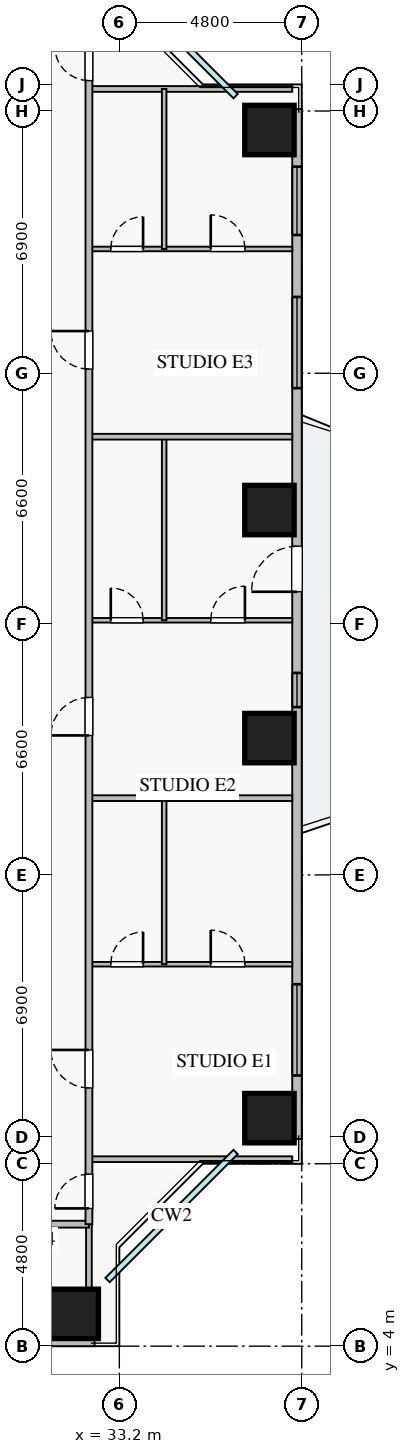
"""IFC4 building model, lengths in metres.
Left out: names, types, materials, properties, quantities, classifications, styles, units other than length and angle.
Written with IfcOpenShell. Run it as: python <this file> out.ifc"""

import sys

from ifc_helpers import new_model, si_unit, direction, frame, frame_2d, origin, origin_2d, place, context, subcontext, project, spatial, rectangle, extrude, source, transform, mapped, element, fill, save


model = new_model("IFC4")
c1 = context("Model", 3, precision=1e-05, world=origin(), true_north=direction((0.0, 1.0)))
c2 = subcontext(c1, "Body", "Model", "MODEL_VIEW")
j1 = project(units=[si_unit("LENGTHUNIT", "METRE"), si_unit("PLANEANGLEUNIT", "RADIAN")], contexts=[c1])
p1 = place(None, origin())
s1 = spatial("IfcSite", under=j1, at=p1, CompositionType="ELEMENT")
p2 = place(p1, origin())
s2 = spatial("IfcBuilding", under=s1, at=p2, CompositionType="ELEMENT")
p3 = place(p2, frame((0.0, 0.0, 53.5)))
s3 = spatial("IfcBuildingStorey", under=s2, at=p3, CompositionType="ELEMENT", Elevation=53.5)
m1 = source(origin(), c2, "Body", "SweptSolid", [
    extrude(rectangle(XDim=1.3, YDim=1.3, at=origin_2d()), origin(), (0.0, 0.0, 1.0), 3.25),
])
for number, where, z_axis, x_axis in (
    (1, (32.0, 4.85, 0.0), (0.0, 0.0, 1.0), (1.0, 0.0, 0.0)),
    (2, (37.15, 10.0, 0.0), (0.0, 0.0, 1.0), (1.0, 0.0, 0.0)),
    (3, (37.15, 20.0, 0.0), (0.0, 0.0, 1.0), (1.0, 0.0, 0.0)),
    (4, (37.15, 26.0, 0.0), (0.0, 0.0, 1.0), (1.0, 0.0, 0.0)),
    (5, (37.15, 36.0, 0.0), (0.0, 0.0, 1.0), (1.0, 0.0, 0.0)),
):
    element("IfcColumn", number, at=place(p3, frame(where, z_axis=z_axis, x_axis=x_axis)), inside=s3, PredefinedType="COLUMN", context=c2, shape_type="MappedRepresentation", body=[
        mapped(m1, transform((0.0, 0.0, 0.0), x_axis=(1.0, 0.0, 0.0), y_axis=(0.0, 1.0, 0.0), z_axis=(0.0, 0.0, 1.0), scale=1.0)),
    ])
p4 = place(p3, frame((5.45, 4.125, 0.0), z_axis=(0.0, 0.0, 1.0), x_axis=(1.0, 0.0, 0.0)))
e6 = element("IfcWall", 6, at=p4, inside=s3, PredefinedType="STANDARD", context=c2, shape_type="SweptSolid", body=[
    extrude(rectangle(XDim=27.1, YDim=0.25, at=frame_2d((13.55, 0.0))), origin(), (0.0, 0.0, 1.0), 2.61),
])
p5 = place(p4, frame((14.4, 0.0, 0.0)))
e7 = element("IfcOpeningElement", 7, at=p5, cuts=e6, PredefinedType="OPENING", context=c2, shape_type="SweptSolid", body=[
    extrude(rectangle(XDim=1.2, YDim=2.1, at=frame_2d((0.6, 1.05))), frame((0.0, 0.135, 0.0), z_axis=(0.0, -1.0, 0.0), x_axis=(1.0, 0.0, 0.0)), (0.0, 0.0, 1.0), 0.27),
])
p6 = place(p4, frame((1.5, 0.0, 0.9)))
e8 = element("IfcOpeningElement", 8, at=p6, cuts=e6, PredefinedType="OPENING", context=c2, shape_type="SweptSolid", body=[
    extrude(rectangle(XDim=1.5, YDim=1.5, at=frame_2d((0.75, 0.75))), frame((0.0, 0.135, 0.0), z_axis=(0.0, -1.0, 0.0), x_axis=(1.0, 0.0, 0.0)), (0.0, 0.0, 1.0), 0.27),
])
p7 = place(p4, frame((9.263, 0.0, 0.9)))
e9 = element("IfcOpeningElement", 9, at=p7, cuts=e6, PredefinedType="OPENING", context=c2, shape_type="SweptSolid", body=[
    extrude(rectangle(XDim=1.8, YDim=1.45, at=frame_2d((0.9, 0.725))), frame((0.0, 0.135, 0.0), z_axis=(0.0, -1.0, 0.0), x_axis=(1.0, 0.0, 0.0)), (0.0, 0.0, 1.0), 0.27),
])
p8 = place(p4, frame((17.95, 0.0, 0.9)))
e10 = element("IfcOpeningElement", 10, at=p8, cuts=e6, PredefinedType="OPENING", context=c2, shape_type="SweptSolid", body=[
    extrude(rectangle(XDim=1.5, YDim=1.5, at=frame_2d((0.75, 0.75))), frame((0.0, 0.135, 0.0), z_axis=(0.0, -1.0, 0.0), x_axis=(1.0, 0.0, 0.0)), (0.0, 0.0, 1.0), 0.27),
])
p9 = place(p4, frame((22.663, 0.0, 0.9)))
e11 = element("IfcOpeningElement", 11, at=p9, cuts=e6, PredefinedType="OPENING", context=c2, shape_type="SweptSolid", body=[
    extrude(rectangle(XDim=2.1, YDim=1.48, at=frame_2d((1.05, 0.74))), frame((0.0, 0.135, 0.0), z_axis=(0.0, -1.0, 0.0), x_axis=(1.0, 0.0, 0.0)), (0.0, 0.0, 1.0), 0.27),
])
p10 = place(p4, frame((4.71, 0.0, 0.9)))
e12 = element("IfcOpeningElement", 12, at=p10, cuts=e6, PredefinedType="OPENING", context=c2, shape_type="SweptSolid", body=[
    extrude(rectangle(XDim=2.4, YDim=1.5, at=frame_2d((1.2, 0.75))), frame((0.0, 0.135, 0.0), z_axis=(0.0, -1.0, 0.0), x_axis=(1.0, 0.0, 0.0)), (0.0, 0.0, 1.0), 0.27),
])
p11 = place(p3, frame((37.875, 9.45, 0.0), z_axis=(0.0, 0.0, 1.0), x_axis=(0.0, 1.0, 0.0)))
e13 = element("IfcWall", 13, at=p11, inside=s3, PredefinedType="STANDARD", context=c2, shape_type="SweptSolid", body=[
    extrude(rectangle(XDim=27.1, YDim=0.25, at=frame_2d((13.55, 0.0))), origin(), (0.0, 0.0, 1.0), 2.61),
])
p12 = place(p11, frame((14.4, 0.0, 0.0)))
e14 = element("IfcOpeningElement", 14, at=p12, cuts=e13, PredefinedType="OPENING", context=c2, shape_type="SweptSolid", body=[
    extrude(rectangle(XDim=1.2, YDim=2.1, at=frame_2d((0.6, 1.05))), frame((0.0, 0.135, 0.0), z_axis=(0.0, -1.0, 0.0), x_axis=(1.0, 0.0, 0.0)), (0.0, 0.0, 1.0), 0.27),
])
p13 = place(p11, frame((1.673, 0.0, 0.9)))
e15 = element("IfcOpeningElement", 15, at=p13, cuts=e13, PredefinedType="OPENING", context=c2, shape_type="SweptSolid", body=[
    extrude(rectangle(XDim=2.4, YDim=1.5, at=frame_2d((1.2, 0.75))), frame((0.0, 0.135, 0.0), z_axis=(0.0, -1.0, 0.0), x_axis=(1.0, 0.0, 0.0)), (0.0, 0.0, 1.0), 0.27),
])
p14 = place(p11, frame((23.788, 0.0, 0.9)))
e16 = element("IfcOpeningElement", 16, at=p14, cuts=e13, PredefinedType="OPENING", context=c2, shape_type="SweptSolid", body=[
    extrude(rectangle(XDim=1.8, YDim=1.5, at=frame_2d((0.9, 0.75))), frame((0.0, 0.135, 0.0), z_axis=(0.0, -1.0, 0.0), x_axis=(1.0, 0.0, 0.0)), (0.0, 0.0, 1.0), 0.27),
])
p15 = place(p11, frame((19.758, 0.0, 0.9)))
e17 = element("IfcOpeningElement", 17, at=p15, cuts=e13, PredefinedType="OPENING", context=c2, shape_type="SweptSolid", body=[
    extrude(rectangle(XDim=2.4, YDim=1.5, at=frame_2d((1.2, 0.75))), frame((0.0, 0.135, 0.0), z_axis=(0.0, -1.0, 0.0), x_axis=(1.0, 0.0, 0.0)), (0.0, 0.0, 1.0), 0.27),
])
p16 = place(p11, frame((11.365, 0.0, 0.9)))
e18 = element("IfcOpeningElement", 18, at=p16, cuts=e13, PredefinedType="OPENING", context=c2, shape_type="SweptSolid", body=[
    extrude(rectangle(XDim=0.9, YDim=1.2, at=frame_2d((0.45, 0.6))), frame((0.0, 0.135, 0.0), z_axis=(0.0, -1.0, 0.0), x_axis=(1.0, 0.0, 0.0)), (0.0, 0.0, 1.0), 0.27),
])
p17 = place(p3, frame((32.4, 4.25, 0.0), z_axis=(0.0, 0.0, 1.0), x_axis=(0.0, 1.0, 0.0)))
e19 = element("IfcWall", 19, at=p17, inside=s3, PredefinedType="PARTITIONING", context=c2, shape_type="SweptSolid", body=[
    extrude(rectangle(XDim=2.96, YDim=0.15, at=frame_2d((1.48, 0.0))), origin(), (0.0, 0.0, 1.0), 3.07),
])
p18 = place(p3, frame((8.82, 7.21, 0.0), z_axis=(0.0, 0.0, 1.0), x_axis=(1.0, 0.0, 0.0)))
e20 = element("IfcWall", 20, at=p18, inside=s3, PredefinedType="PARTITIONING", context=c2, shape_type="SweptSolid", body=[
    extrude(rectangle(XDim=23.58, YDim=0.18, at=frame_2d((11.79, 0.0))), origin(), (0.0, 0.0, 1.0), 3.07),
])
p19 = place(p18, frame((2.04, 0.0, 0.0)))
e21 = element("IfcOpeningElement", 21, at=p19, cuts=e20, PredefinedType="OPENING", context=c2, shape_type="SweptSolid", body=[
    extrude(rectangle(XDim=1.0, YDim=2.05, at=frame_2d((0.5, 1.025))), frame((0.0, 0.1, 0.0), z_axis=(0.0, -1.0, 0.0), x_axis=(1.0, 0.0, 0.0)), (0.0, 0.0, 1.0), 0.2),
])
p20 = place(p18, frame((8.53, 0.0, 0.0)))
e22 = element("IfcOpeningElement", 22, at=p20, cuts=e20, PredefinedType="OPENING", context=c2, shape_type="SweptSolid", body=[
    extrude(rectangle(XDim=1.0, YDim=2.05, at=frame_2d((0.5, 1.025))), frame((0.0, 0.1, 0.0), z_axis=(0.0, -1.0, 0.0), x_axis=(1.0, 0.0, 0.0)), (0.0, 0.0, 1.0), 0.2),
])
p21 = place(p18, frame((14.83, 0.0, 0.0)))
e23 = element("IfcOpeningElement", 23, at=p21, cuts=e20, PredefinedType="OPENING", context=c2, shape_type="SweptSolid", body=[
    extrude(rectangle(XDim=1.0, YDim=2.05, at=frame_2d((0.5, 1.025))), frame((0.0, 0.1, 0.0), z_axis=(0.0, -1.0, 0.0), x_axis=(1.0, 0.0, 0.0)), (0.0, 0.0, 1.0), 0.2),
])
p22 = place(p18, frame((20.13, 0.0, 0.0)))
e24 = element("IfcOpeningElement", 24, at=p22, cuts=e20, PredefinedType="OPENING", context=c2, shape_type="SweptSolid", body=[
    extrude(rectangle(XDim=1.0, YDim=2.05, at=frame_2d((0.5, 1.025))), frame((0.0, 0.1, 0.0), z_axis=(0.0, -1.0, 0.0), x_axis=(1.0, 0.0, 0.0)), (0.0, 0.0, 1.0), 0.2),
])
for number, where, z_axis, x_axis in (
    (25, (32.4, 37.08, 0.0), (0.0, 0.0, 1.0), (1.0, 0.0, 0.0)),
    (26, (32.4, 8.92, 0.0), (0.0, 0.0, 1.0), (1.0, 0.0, 0.0)),
):
    element("IfcWall", number, at=place(p3, frame(where, z_axis=z_axis, x_axis=x_axis)), inside=s3, PredefinedType="PARTITIONING", context=c2, shape_type="SweptSolid", body=[
        extrude(rectangle(XDim=5.35, YDim=0.15, at=frame_2d((2.675, 0.0))), origin(), (0.0, 0.0, 1.0), 3.07),
    ])
p23 = place(p3, frame((32.4, 14.05, 0.0), z_axis=(0.0, 0.0, 1.0), x_axis=(1.0, 0.0, 0.0)))
e27 = element("IfcWall", 27, at=p23, inside=s3, PredefinedType="PLUMBINGWALL", context=c2, shape_type="SweptSolid", body=[
    extrude(rectangle(XDim=5.35, YDim=0.12, at=frame_2d((2.675, 0.0))), origin(), (0.0, 0.0, 1.0), 3.07),
])
p24 = place(p23, frame((0.575, 0.0, 0.0)))
e28 = element("IfcOpeningElement", 28, at=p24, cuts=e27, PredefinedType="OPENING", context=c2, shape_type="SweptSolid", body=[
    extrude(rectangle(XDim=0.85, YDim=2.05, at=frame_2d((0.425, 1.025))), frame((0.0, 0.07, 0.0), z_axis=(0.0, -1.0, 0.0), x_axis=(1.0, 0.0, 0.0)), (0.0, 0.0, 1.0), 0.14),
])
p25 = place(p23, frame((3.205, 0.0, 0.0)))
e29 = element("IfcOpeningElement", 29, at=p25, cuts=e27, PredefinedType="OPENING", context=c2, shape_type="SweptSolid", body=[
    extrude(rectangle(XDim=0.9, YDim=2.05, at=frame_2d((0.45, 1.025))), frame((0.0, 0.07, 0.0), z_axis=(0.0, -1.0, 0.0), x_axis=(1.0, 0.0, 0.0)), (0.0, 0.0, 1.0), 0.14),
])
p26 = place(p3, frame((34.38, 14.05, 0.0), z_axis=(0.0, 0.0, 1.0), x_axis=(0.0, 1.0, 0.0)))
e30 = element("IfcWall", 30, at=p26, inside=s3, PredefinedType="PLUMBINGWALL", context=c2, shape_type="SweptSolid", body=[
    extrude(rectangle(XDim=4.37, YDim=0.12, at=frame_2d((2.185, 0.0))), origin(), (0.0, 0.0, 1.0), 3.07),
])
p27 = place(p3, frame((32.4, 23.1, 0.0), z_axis=(0.0, 0.0, 1.0), x_axis=(1.0, 0.0, 0.0)))
e31 = element("IfcWall", 31, at=p27, inside=s3, PredefinedType="PLUMBINGWALL", context=c2, shape_type="SweptSolid", body=[
    extrude(rectangle(XDim=5.35, YDim=0.12, at=frame_2d((2.675, 0.0))), origin(), (0.0, 0.0, 1.0), 3.07),
])
p28 = place(p27, frame((0.575, 0.0, 0.0)))
e32 = element("IfcOpeningElement", 32, at=p28, cuts=e31, PredefinedType="OPENING", context=c2, shape_type="SweptSolid", body=[
    extrude(rectangle(XDim=0.85, YDim=2.05, at=frame_2d((0.425, 1.025))), frame((0.0, 0.07, 0.0), z_axis=(0.0, -1.0, 0.0), x_axis=(1.0, 0.0, 0.0)), (0.0, 0.0, 1.0), 0.14),
])
p29 = place(p27, frame((3.205, 0.0, 0.0)))
e33 = element("IfcOpeningElement", 33, at=p29, cuts=e31, PredefinedType="OPENING", context=c2, shape_type="SweptSolid", body=[
    extrude(rectangle(XDim=0.9, YDim=2.05, at=frame_2d((0.45, 1.025))), frame((0.0, 0.07, 0.0), z_axis=(0.0, -1.0, 0.0), x_axis=(1.0, 0.0, 0.0)), (0.0, 0.0, 1.0), 0.14),
])
p30 = place(p3, frame((34.38, 23.1, 0.0), z_axis=(0.0, 0.0, 1.0), x_axis=(0.0, 1.0, 0.0)))
e34 = element("IfcWall", 34, at=p30, inside=s3, PredefinedType="PLUMBINGWALL", context=c2, shape_type="SweptSolid", body=[
    extrude(rectangle(XDim=4.83, YDim=0.12, at=frame_2d((2.415, 0.0))), origin(), (0.0, 0.0, 1.0), 3.07),
])
p31 = place(p3, frame((32.4, 18.42, 0.0), z_axis=(0.0, 0.0, 1.0), x_axis=(1.0, 0.0, 0.0)))
e35 = element("IfcWall", 35, at=p31, inside=s3, PredefinedType="PARTITIONING", context=c2, shape_type="SweptSolid", body=[
    extrude(rectangle(XDim=5.35, YDim=0.15, at=frame_2d((2.675, 0.0))), origin(), (0.0, 0.0, 1.0), 3.07),
])
p32 = place(p3, frame((32.4, 32.87, 0.0), z_axis=(0.0, 0.0, 1.0), x_axis=(1.0, 0.0, 0.0)))
e36 = element("IfcWall", 36, at=p32, inside=s3, PredefinedType="PLUMBINGWALL", context=c2, shape_type="SweptSolid", body=[
    extrude(rectangle(XDim=5.35, YDim=0.12, at=frame_2d((2.675, 0.0))), origin(), (0.0, 0.0, 1.0), 3.07),
])
p33 = place(p32, frame((0.575, 0.0, 0.0)))
e37 = element("IfcOpeningElement", 37, at=p33, cuts=e36, PredefinedType="OPENING", context=c2, shape_type="SweptSolid", body=[
    extrude(rectangle(XDim=0.85, YDim=2.05, at=frame_2d((0.425, 1.025))), frame((0.0, 0.07, 0.0), z_axis=(0.0, -1.0, 0.0), x_axis=(1.0, 0.0, 0.0)), (0.0, 0.0, 1.0), 0.14),
])
p34 = place(p32, frame((3.205, 0.0, 0.0)))
e38 = element("IfcOpeningElement", 38, at=p34, cuts=e36, PredefinedType="OPENING", context=c2, shape_type="SweptSolid", body=[
    extrude(rectangle(XDim=0.9, YDim=2.05, at=frame_2d((0.45, 1.025))), frame((0.0, 0.07, 0.0), z_axis=(0.0, -1.0, 0.0), x_axis=(1.0, 0.0, 0.0)), (0.0, 0.0, 1.0), 0.14),
])
p35 = place(p3, frame((34.38, 32.87, 0.0), z_axis=(0.0, 0.0, 1.0), x_axis=(0.0, 1.0, 0.0)))
e39 = element("IfcWall", 39, at=p35, inside=s3, PredefinedType="PLUMBINGWALL", context=c2, shape_type="SweptSolid", body=[
    extrude(rectangle(XDim=4.21, YDim=0.12, at=frame_2d((2.105, 0.0))), origin(), (0.0, 0.0, 1.0), 3.07),
])
p36 = place(p3, frame((32.4, 27.93, 0.0), z_axis=(0.0, 0.0, 1.0), x_axis=(1.0, 0.0, 0.0)))
e40 = element("IfcWall", 40, at=p36, inside=s3, PredefinedType="PARTITIONING", context=c2, shape_type="SweptSolid", body=[
    extrude(rectangle(XDim=5.35, YDim=0.15, at=frame_2d((2.675, 0.0))), origin(), (0.0, 0.0, 1.0), 2.865),
])
p37 = place(p3, frame((32.4, 7.21, 0.0), z_axis=(0.0, 0.0, 1.0), x_axis=(0.0, 1.0, 0.0)))
e41 = element("IfcWall", 41, at=p37, inside=s3, PredefinedType="PARTITIONING", context=c2, shape_type="SweptSolid", body=[
    extrude(rectangle(XDim=31.23, YDim=0.18, at=frame_2d((15.615, 0.0))), origin(), (0.0, 0.0, 1.0), 2.771),
])
p38 = place(p37, frame((30.09, 0.0, 0.0)))
e42 = element("IfcOpeningElement", 42, at=p38, cuts=e41, PredefinedType="OPENING", context=c2, shape_type="SweptSolid", body=[
    extrude(rectangle(XDim=0.9, YDim=2.05, at=frame_2d((0.45, 1.025))), frame((0.0, 0.1, 0.0), z_axis=(0.0, -1.0, 0.0), x_axis=(1.0, 0.0, 0.0)), (0.0, 0.0, 1.0), 0.2),
])
p39 = place(p37, frame((0.415, 0.0, 0.0)))
e43 = element("IfcOpeningElement", 43, at=p39, cuts=e41, PredefinedType="OPENING", context=c2, shape_type="SweptSolid", body=[
    extrude(rectangle(XDim=0.9, YDim=2.05, at=frame_2d((0.45, 1.025))), frame((0.0, 0.1, 0.0), z_axis=(0.0, -1.0, 0.0), x_axis=(1.0, 0.0, 0.0)), (0.0, 0.0, 1.0), 0.2),
])
p40 = place(p37, frame((3.585, 0.0, 0.0)))
e44 = element("IfcOpeningElement", 44, at=p40, cuts=e41, PredefinedType="OPENING", context=c2, shape_type="SweptSolid", body=[
    extrude(rectangle(XDim=1.0, YDim=2.05, at=frame_2d((0.5, 1.025))), frame((0.0, 0.1, 0.0), z_axis=(0.0, -1.0, 0.0), x_axis=(1.0, 0.0, 0.0)), (0.0, 0.0, 1.0), 0.2),
])
p41 = place(p37, frame((12.86, 0.0, 0.0)))
e45 = element("IfcOpeningElement", 45, at=p41, cuts=e41, PredefinedType="OPENING", context=c2, shape_type="SweptSolid", body=[
    extrude(rectangle(XDim=1.0, YDim=2.05, at=frame_2d((0.5, 1.025))), frame((0.0, 0.1, 0.0), z_axis=(0.0, -1.0, 0.0), x_axis=(1.0, 0.0, 0.0)), (0.0, 0.0, 1.0), 0.2),
])
p42 = place(p37, frame((22.5, 0.0, 0.0)))
e46 = element("IfcOpeningElement", 46, at=p42, cuts=e41, PredefinedType="OPENING", context=c2, shape_type="SweptSolid", body=[
    extrude(rectangle(XDim=1.0, YDim=2.05, at=frame_2d((0.5, 1.025))), frame((0.0, 0.1, 0.0), z_axis=(0.0, -1.0, 0.0), x_axis=(1.0, 0.0, 0.0)), (0.0, 0.0, 1.0), 0.2),
])
m2 = source(origin(), c2, "Body", "SweptSolid", [
    extrude(rectangle(XDim=1.2, YDim=2.1, at=frame_2d((0.6, 1.05))), frame((0.0, 0.025, 0.0), z_axis=(0.0, -1.0, 0.0), x_axis=(1.0, 0.0, 0.0)), (0.0, 0.0, 1.0), 0.05),
])
p43 = place(p12, origin())
e47 = element("IfcDoor", 47, at=p43, inside=s3, OperationType="SINGLE_SWING_LEFT", PredefinedType="DOOR", context=c2, shape_type="MappedRepresentation", body=[
    mapped(m2, transform((0.0, 0.0, 0.0), x_axis=(1.0, 0.0, 0.0), y_axis=(0.0, 1.0, 0.0), z_axis=(0.0, 0.0, 1.0), scale=1.0)),
])
fill(e14, e47)
m3 = source(origin(), c2, "Body", "SweptSolid", [
    extrude(rectangle(XDim=2.4, YDim=1.5, at=frame_2d((1.2, 0.75))), frame((0.0, 0.03, 0.0), z_axis=(0.0, -1.0, 0.0), x_axis=(1.0, 0.0, 0.0)), (0.0, 0.0, 1.0), 0.06),
])
p44 = place(p13, origin())
e48 = element("IfcWindow", 48, at=p44, inside=s3, PartitioningType="TRIPLE_PANEL_VERTICAL", PredefinedType="WINDOW", context=c2, shape_type="MappedRepresentation", body=[
    mapped(m3, transform((0.0, 0.0, 0.0), x_axis=(1.0, 0.0, 0.0), y_axis=(0.0, 1.0, 0.0), z_axis=(0.0, 0.0, 1.0), scale=1.0)),
])
fill(e15, e48)
m4 = source(origin(), c2, "Body", "SweptSolid", [
    extrude(rectangle(XDim=1.8, YDim=1.5, at=frame_2d((0.9, 0.75))), frame((0.0, 0.03, 0.0), z_axis=(0.0, -1.0, 0.0), x_axis=(1.0, 0.0, 0.0)), (0.0, 0.0, 1.0), 0.06),
])
p45 = place(p14, origin())
e49 = element("IfcWindow", 49, at=p45, inside=s3, PartitioningType="TRIPLE_PANEL_VERTICAL", PredefinedType="WINDOW", context=c2, shape_type="MappedRepresentation", body=[
    mapped(m4, transform((0.0, 0.0, 0.0), x_axis=(1.0, 0.0, 0.0), y_axis=(0.0, 1.0, 0.0), z_axis=(0.0, 0.0, 1.0), scale=1.0)),
])
fill(e16, e49)
m5 = source(origin(), c2, "Body", "SweptSolid", [
    extrude(rectangle(XDim=0.85, YDim=2.05, at=frame_2d((0.425, 1.025))), frame((0.0, 0.025, 0.0), z_axis=(0.0, -1.0, 0.0), x_axis=(1.0, 0.0, 0.0)), (0.0, 0.0, 1.0), 0.05),
])
p46 = place(p24, origin())
e50 = element("IfcDoor", 50, at=p46, inside=s3, OperationType="SINGLE_SWING_RIGHT", PredefinedType="DOOR", context=c2, shape_type="MappedRepresentation", body=[
    mapped(m5, transform((0.0, 0.0, 0.0), x_axis=(1.0, 0.0, 0.0), y_axis=(0.0, 1.0, 0.0), z_axis=(0.0, 0.0, 1.0), scale=1.0)),
])
fill(e28, e50)
m6 = source(origin(), c2, "Body", "SweptSolid", [
    extrude(rectangle(XDim=0.9, YDim=2.05, at=frame_2d((0.45, 1.025))), frame((0.0, 0.025, 0.0), z_axis=(0.0, -1.0, 0.0), x_axis=(1.0, 0.0, 0.0)), (0.0, 0.0, 1.0), 0.05),
])
p47 = place(p25, origin())
e51 = element("IfcDoor", 51, at=p47, inside=s3, OperationType="SINGLE_SWING_LEFT", PredefinedType="DOOR", context=c2, shape_type="MappedRepresentation", body=[
    mapped(m6, transform((0.0, 0.0, 0.0), x_axis=(1.0, 0.0, 0.0), y_axis=(0.0, 1.0, 0.0), z_axis=(0.0, 0.0, 1.0), scale=1.0)),
])
fill(e29, e51)
p48 = place(p28, origin())
e52 = element("IfcDoor", 52, at=p48, inside=s3, OperationType="SINGLE_SWING_LEFT", PredefinedType="DOOR", context=c2, shape_type="MappedRepresentation", body=[
    mapped(m5, transform((0.0, 0.0, 0.0), x_axis=(1.0, 0.0, 0.0), y_axis=(0.0, 1.0, 0.0), z_axis=(0.0, 0.0, 1.0), scale=1.0)),
])
fill(e32, e52)
p49 = place(p29, origin())
e53 = element("IfcDoor", 53, at=p49, inside=s3, OperationType="SINGLE_SWING_RIGHT", PredefinedType="DOOR", context=c2, shape_type="MappedRepresentation", body=[
    mapped(m6, transform((0.0, 0.0, 0.0), x_axis=(1.0, 0.0, 0.0), y_axis=(0.0, 1.0, 0.0), z_axis=(0.0, 0.0, 1.0), scale=1.0)),
])
fill(e33, e53)
p50 = place(p33, origin())
e54 = element("IfcDoor", 54, at=p50, inside=s3, OperationType="SINGLE_SWING_RIGHT", PredefinedType="DOOR", context=c2, shape_type="MappedRepresentation", body=[
    mapped(m5, transform((0.0, 0.0, 0.0), x_axis=(1.0, 0.0, 0.0), y_axis=(0.0, 1.0, 0.0), z_axis=(0.0, 0.0, 1.0), scale=1.0)),
])
fill(e37, e54)
p51 = place(p34, origin())
e55 = element("IfcDoor", 55, at=p51, inside=s3, OperationType="SINGLE_SWING_LEFT", PredefinedType="DOOR", context=c2, shape_type="MappedRepresentation", body=[
    mapped(m6, transform((0.0, 0.0, 0.0), x_axis=(1.0, 0.0, 0.0), y_axis=(0.0, 1.0, 0.0), z_axis=(0.0, 0.0, 1.0), scale=1.0)),
])
fill(e38, e55)
p52 = place(p38, origin())
e56 = element("IfcDoor", 56, at=p52, inside=s3, OperationType="SINGLE_SWING_RIGHT", PredefinedType="DOOR", context=c2, shape_type="MappedRepresentation", body=[
    mapped(m6, transform((0.0, 0.0, 0.0), x_axis=(1.0, 0.0, 0.0), y_axis=(0.0, 1.0, 0.0), z_axis=(0.0, 0.0, 1.0), scale=1.0)),
])
fill(e42, e56)
p53 = place(p39, origin())
e57 = element("IfcDoor", 57, at=p53, inside=s3, OperationType="SINGLE_SWING_LEFT", PredefinedType="DOOR", context=c2, shape_type="MappedRepresentation", body=[
    mapped(m6, transform((0.0, 0.0, 0.0), x_axis=(1.0, 0.0, 0.0), y_axis=(0.0, 1.0, 0.0), z_axis=(0.0, 0.0, 1.0), scale=1.0)),
])
fill(e43, e57)
m7 = source(origin(), c2, "Body", "SweptSolid", [
    extrude(rectangle(XDim=1.0, YDim=2.05, at=frame_2d((0.5, 1.025))), frame((0.0, 0.025, 0.0), z_axis=(0.0, -1.0, 0.0), x_axis=(1.0, 0.0, 0.0)), (0.0, 0.0, 1.0), 0.05),
])
p54 = place(p40, origin())
e58 = element("IfcDoor", 58, at=p54, inside=s3, OperationType="SINGLE_SWING_RIGHT", PredefinedType="DOOR", context=c2, shape_type="MappedRepresentation", body=[
    mapped(m7, transform((0.0, 0.0, 0.0), x_axis=(1.0, 0.0, 0.0), y_axis=(0.0, 1.0, 0.0), z_axis=(0.0, 0.0, 1.0), scale=1.0)),
])
fill(e44, e58)
p55 = place(p41, origin())
e59 = element("IfcDoor", 59, at=p55, inside=s3, OperationType="SINGLE_SWING_LEFT", PredefinedType="DOOR", context=c2, shape_type="MappedRepresentation", body=[
    mapped(m7, transform((0.0, 0.0, 0.0), x_axis=(1.0, 0.0, 0.0), y_axis=(0.0, 1.0, 0.0), z_axis=(0.0, 0.0, 1.0), scale=1.0)),
])
fill(e45, e59)
p56 = place(p42, origin())
e60 = element("IfcDoor", 60, at=p56, inside=s3, OperationType="SINGLE_SWING_RIGHT", PredefinedType="DOOR", context=c2, shape_type="MappedRepresentation", body=[
    mapped(m7, transform((0.0, 0.0, 0.0), x_axis=(1.0, 0.0, 0.0), y_axis=(0.0, 1.0, 0.0), z_axis=(0.0, 0.0, 1.0), scale=1.0)),
])
fill(e46, e60)
p57 = place(p15, origin())
e61 = element("IfcWindow", 61, at=p57, inside=s3, PartitioningType="TRIPLE_PANEL_VERTICAL", PredefinedType="WINDOW", context=c2, shape_type="MappedRepresentation", body=[
    mapped(m3, transform((0.0, 0.0, 0.0), x_axis=(1.0, 0.0, 0.0), y_axis=(0.0, 1.0, 0.0), z_axis=(0.0, 0.0, 1.0), scale=1.0)),
])
fill(e17, e61)
m8 = source(origin(), c2, "Body", "SweptSolid", [
    extrude(rectangle(XDim=0.9, YDim=1.2, at=frame_2d((0.45, 0.6))), frame((0.0, 0.03, 0.0), z_axis=(0.0, -1.0, 0.0), x_axis=(1.0, 0.0, 0.0)), (0.0, 0.0, 1.0), 0.06),
])
p58 = place(p16, origin())
e62 = element("IfcWindow", 62, at=p58, inside=s3, PartitioningType="SINGLE_PANEL", PredefinedType="WINDOW", context=c2, shape_type="MappedRepresentation", body=[
    mapped(m8, transform((0.0, 0.0, 0.0), x_axis=(1.0, 0.0, 0.0), y_axis=(0.0, 1.0, 0.0), z_axis=(0.0, 0.0, 1.0), scale=1.0)),
])
fill(e18, e62)
save(model, sys.argv[1])
